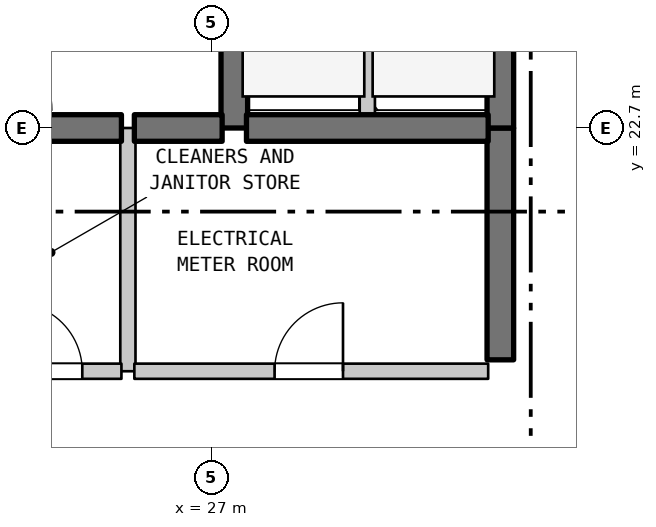
"""IFC4 building model, lengths in metres.
Left out: names, types, materials, properties, quantities, classifications, styles, units other than length and angle.
Written with IfcOpenShell. Run it as: python <this file> out.ifc"""

import sys

from ifc_helpers import new_model, si_unit, direction, frame, frame_2d, origin, place, context, subcontext, project, spatial, rectangle, extrude, element, fill, save


model = new_model("IFC4")
c1 = context("Model", 3, precision=1e-05, world=origin(), true_north=direction((0.0, 1.0)))
c2 = subcontext(c1, "Body", "Model", "MODEL_VIEW")
j1 = project(units=[si_unit("LENGTHUNIT", "METRE"), si_unit("PLANEANGLEUNIT", "RADIAN")], contexts=[c1])
p1 = place(None, origin())
s1 = spatial("IfcSite", under=j1, at=p1, CompositionType="ELEMENT")
p2 = place(p1, origin())
s2 = spatial("IfcBuilding", under=s1, at=p2, CompositionType="ELEMENT")
p3 = place(p2, frame((0.0, 0.0, 24.0)))
s3 = spatial("IfcBuildingStorey", under=s2, at=p3, CompositionType="ELEMENT", Elevation=24.0)
p4 = place(p3, frame((25.9, 19.5, 0.0), z_axis=(0.0, 0.0, 1.0), x_axis=(0.0, 1.0, 0.0)))
e1 = element("IfcWall", 1, at=p4, inside=s3, PredefinedType="STANDARD", context=c2, shape_type="SweptSolid", body=[
    extrude(rectangle(XDim=3.2, YDim=0.2, at=frame_2d((1.6, 0.0))), origin(), (0.0, 0.0, 1.0), 3.385),
])
p5 = place(p3, frame((27.3, 22.7, 0.0), z_axis=(0.0, 0.0, 1.0), x_axis=(0.0, 1.0, 0.0)))
e2 = element("IfcWall", 2, at=p5, inside=s3, PredefinedType="SHEAR", context=c2, shape_type="SweptSolid", body=[
    extrude(rectangle(XDim=2.9, YDim=0.35, at=frame_2d((1.45, 0.0))), origin(), (0.0, 0.0, 1.0), 3.385),
])
p6 = place(p3, frame((29.05, 22.7, 0.0), z_axis=(0.0, 0.0, 1.0), x_axis=(0.0, 1.0, 0.0)))
e3 = element("IfcWall", 3, at=p6, inside=s3, PredefinedType="STANDARD", context=c2, shape_type="SweptSolid", body=[
    extrude(rectangle(XDim=2.9, YDim=0.2, at=frame_2d((1.45, 0.0))), origin(), (0.0, 0.0, 1.0), 3.385),
])
p7 = place(p3, frame((30.8, 19.65, 0.0), z_axis=(0.0, 0.0, 1.0), x_axis=(0.0, 1.0, 0.0)))
e4 = element("IfcWall", 4, at=p7, inside=s3, PredefinedType="SHEAR", context=c2, shape_type="SweptSolid", body=[
    extrude(rectangle(XDim=3.05, YDim=0.35, at=frame_2d((1.525, 0.0))), origin(), (0.0, 0.0, 1.0), 3.385),
])
p8 = place(p3, frame((30.8, 22.7, 0.0), z_axis=(0.0, 0.0, 1.0), x_axis=(0.0, 1.0, 0.0)))
e5 = element("IfcWall", 5, at=p8, inside=s3, PredefinedType="SHEAR", context=c2, shape_type="SweptSolid", body=[
    extrude(rectangle(XDim=2.9, YDim=0.35, at=frame_2d((1.45, 0.0))), origin(), (0.0, 0.0, 1.0), 3.385),
])
p9 = place(p3, frame((23.96, 19.5, 0.0), z_axis=(0.0, 0.0, 1.0), x_axis=(1.0, 0.0, 0.0)))
e6 = element("IfcWall", 6, at=p9, inside=s3, PredefinedType="STANDARD", context=c2, shape_type="SweptSolid", body=[
    extrude(rectangle(XDim=1.855, YDim=0.2, at=frame_2d((0.927, 0.0))), origin(), (0.0, 0.0, 1.0), 3.385),
])
p10 = place(p9, frame((0.44, 0.0, 0.0)))
e7 = element("IfcOpeningElement", 7, at=p10, cuts=e6, PredefinedType="OPENING", context=c2, shape_type="SweptSolid", body=[
    extrude(rectangle(XDim=0.9, YDim=2.15, at=frame_2d((0.45, 1.075))), frame((0.0, 0.11, 0.0), z_axis=(0.0, -1.0, 0.0), x_axis=(1.0, 0.0, 0.0)), (0.0, 0.0, 1.0), 0.22),
])
p11 = place(p3, frame((25.985, 19.5, 0.0), z_axis=(0.0, 0.0, 1.0), x_axis=(1.0, 0.0, 0.0)))
e8 = element("IfcWall", 8, at=p11, inside=s3, PredefinedType="STANDARD", context=c2, shape_type="SweptSolid", body=[
    extrude(rectangle(XDim=4.655, YDim=0.2, at=frame_2d((2.327, 0.0))), origin(), (0.0, 0.0, 1.0), 3.385),
])
p12 = place(p11, frame((1.845, 0.0, 0.0)))
e9 = element("IfcOpeningElement", 9, at=p12, cuts=e8, PredefinedType="OPENING", context=c2, shape_type="SweptSolid", body=[
    extrude(rectangle(XDim=0.9, YDim=2.15, at=frame_2d((0.45, 1.075))), frame((0.0, 0.11, 0.0), z_axis=(0.0, -1.0, 0.0), x_axis=(1.0, 0.0, 0.0)), (0.0, 0.0, 1.0), 0.22),
])
p13 = place(p3, frame((23.96, 22.7, 0.0), z_axis=(0.0, 0.0, 1.0), x_axis=(1.0, 0.0, 0.0)))
e10 = element("IfcWall", 10, at=p13, inside=s3, PredefinedType="SHEAR", context=c2, shape_type="SweptSolid", body=[
    extrude(rectangle(XDim=1.855, YDim=0.35, at=frame_2d((0.927, 0.0))), origin(), (0.0, 0.0, 1.0), 3.385),
])
p14 = place(p3, frame((25.985, 22.7, 0.0), z_axis=(0.0, 0.0, 1.0), x_axis=(1.0, 0.0, 0.0)))
e11 = element("IfcWall", 11, at=p14, inside=s3, PredefinedType="SHEAR", context=c2, shape_type="SweptSolid", body=[
    extrude(rectangle(XDim=1.155, YDim=0.35, at=frame_2d((0.577, 0.0))), origin(), (0.0, 0.0, 1.0), 3.385),
])
p15 = place(p3, frame((27.46, 22.7, 0.0), z_axis=(0.0, 0.0, 1.0), x_axis=(1.0, 0.0, 0.0)))
e12 = element("IfcWall", 12, at=p15, inside=s3, PredefinedType="SHEAR", context=c2, shape_type="SweptSolid", body=[
    extrude(rectangle(XDim=3.18, YDim=0.35, at=frame_2d((1.59, 0.0))), origin(), (0.0, 0.0, 1.0), 3.385),
])
p16 = place(p10, origin())
e13 = element("IfcDoor", 13, at=p16, inside=s3, OperationType="SINGLE_SWING_LEFT", PredefinedType="DOOR", context=c2, shape_type="SweptSolid", body=[
    extrude(rectangle(XDim=0.9, YDim=2.15, at=frame_2d((0.45, 1.075))), frame((0.0, 0.025, 0.0), z_axis=(0.0, -1.0, 0.0), x_axis=(1.0, 0.0, 0.0)), (0.0, 0.0, 1.0), 0.05),
])
fill(e7, e13)
p17 = place(p12, origin())
e14 = element("IfcDoor", 14, at=p17, inside=s3, OperationType="SINGLE_SWING_RIGHT", PredefinedType="DOOR", context=c2, shape_type="SweptSolid", body=[
    extrude(rectangle(XDim=0.9, YDim=2.15, at=frame_2d((0.45, 1.075))), frame((0.0, 0.025, 0.0), z_axis=(0.0, -1.0, 0.0), x_axis=(1.0, 0.0, 0.0)), (0.0, 0.0, 1.0), 0.05),
])
fill(e9, e14)
save(model, sys.argv[1])
